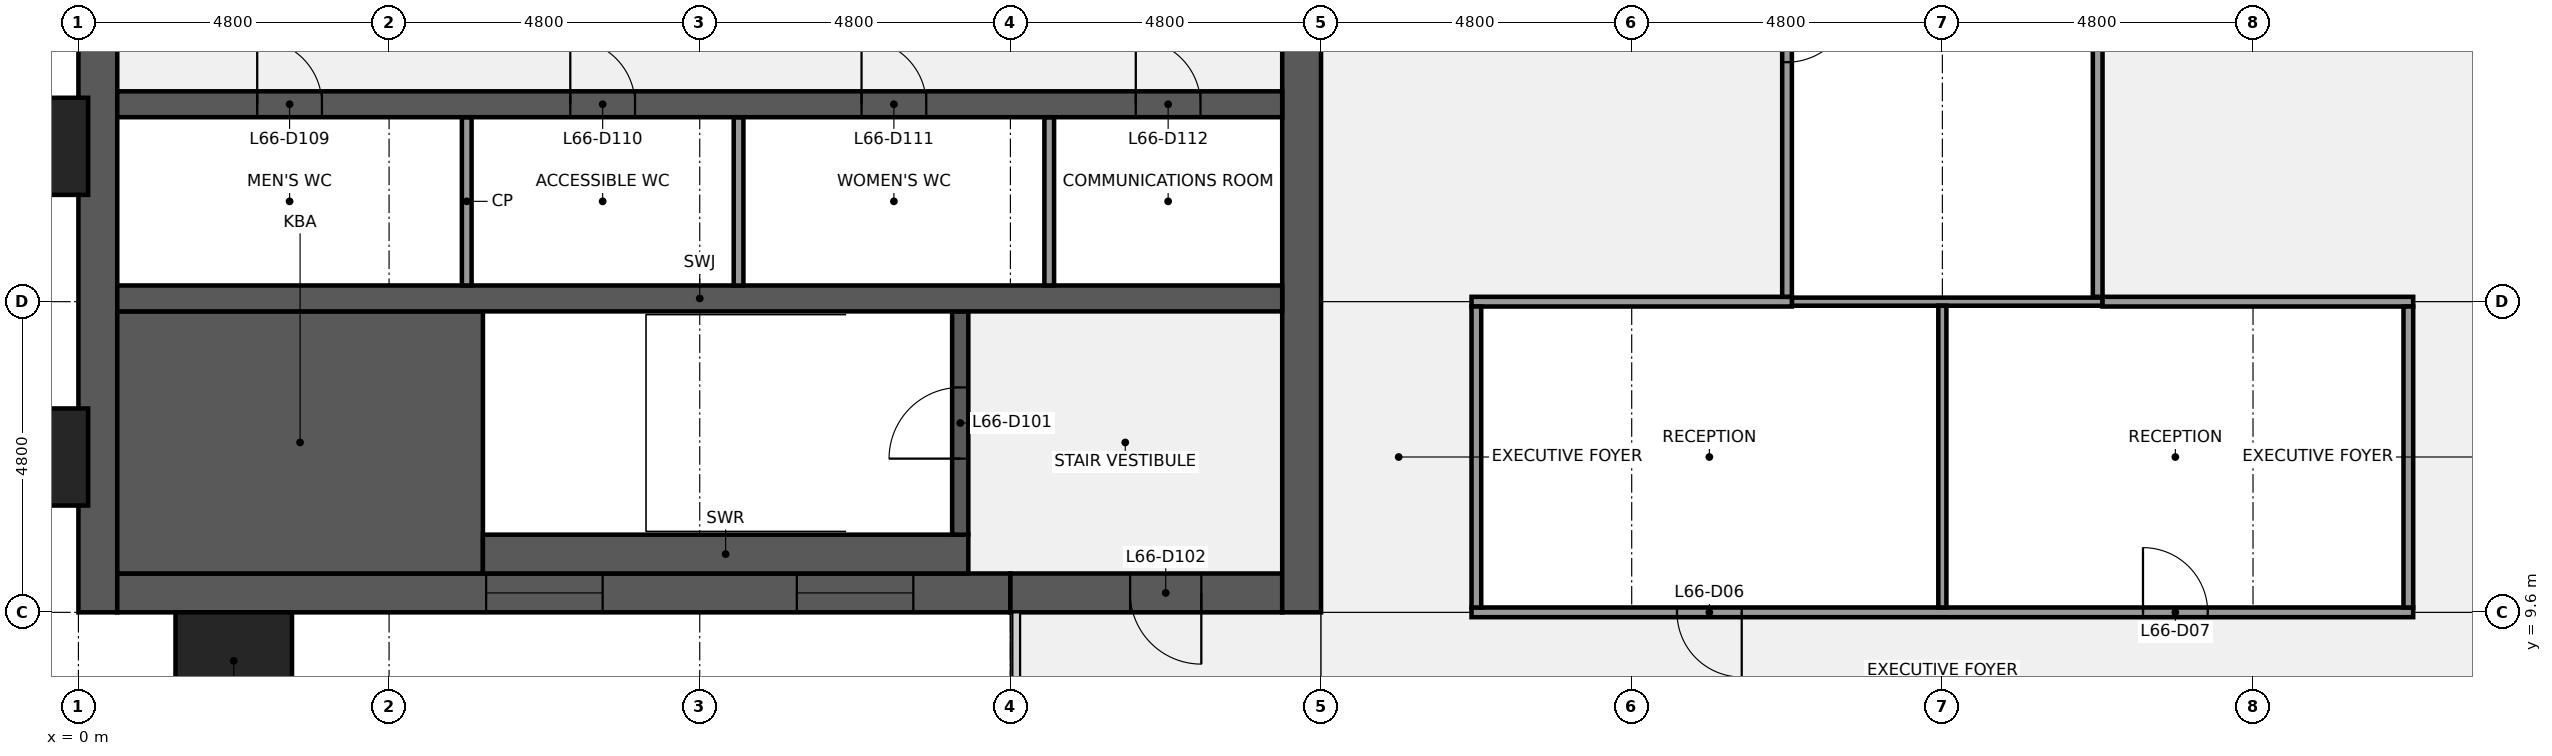
"""IFC4 building model, lengths in metres.
Left out: names, types, materials, properties, quantities, classifications, styles, units other than length and angle.
Written with IfcOpenShell. Run it as: python <this file> out.ifc"""

import sys

from ifc_helpers import new_model, si_unit, direction, frame, frame_2d, origin, origin_2d, place, context, subcontext, project, spatial, rectangle, extrude, element, fill, save


model = new_model("IFC4")
c1 = context("Model", 3, precision=1e-05, world=origin(), true_north=direction((0.0, 1.0)))
c2 = subcontext(c1, "Body", "Model", "MODEL_VIEW")
j1 = project(units=[si_unit("LENGTHUNIT", "METRE"), si_unit("PLANEANGLEUNIT", "RADIAN")], contexts=[c1])
p1 = place(None, origin())
s1 = spatial("IfcSite", under=j1, at=p1, CompositionType="ELEMENT")
p2 = place(p1, origin())
s2 = spatial("IfcBuilding", under=s1, at=p2, CompositionType="ELEMENT")
p3 = place(p2, frame((0.0, 0.0, 302.3)))
s3 = spatial("IfcBuildingStorey", under=s2, at=p3, CompositionType="ELEMENT", Elevation=302.3)
p4 = place(p3, frame((0.3, 9.6, 0.0), z_axis=(0.0, 0.0, 1.0), x_axis=(0.0, 1.0, 0.0)))
e1 = element("IfcWall", 1, at=p4, inside=s3, PredefinedType="SHEAR", context=c2, shape_type="SweptSolid", body=[
    extrude(rectangle(XDim=28.8, YDim=0.6, at=frame_2d((14.4, 0.0))), origin(), (0.0, 0.0, 1.0), 3.84),
])
p5 = place(p4, frame((8.85, 0.0, 0.9)))
e2 = element("IfcOpeningElement", 2, at=p5, cuts=e1, PredefinedType="OPENING", context=c2, shape_type="SweptSolid", body=[
    extrude(rectangle(XDim=1.5, YDim=1.5, at=frame_2d((0.75, 0.75))), frame((0.0, 0.31, 0.0), z_axis=(0.0, -1.0, 0.0), x_axis=(1.0, 0.0, 0.0)), (0.0, 0.0, 1.0), 0.62),
])
p6 = place(p4, frame((18.45, 0.0, 0.9)))
e3 = element("IfcOpeningElement", 3, at=p6, cuts=e1, PredefinedType="OPENING", context=c2, shape_type="SweptSolid", body=[
    extrude(rectangle(XDim=1.5, YDim=1.5, at=frame_2d((0.75, 0.75))), frame((0.0, 0.31, 0.0), z_axis=(0.0, -1.0, 0.0), x_axis=(1.0, 0.0, 0.0)), (0.0, 0.0, 1.0), 0.62),
])
p7 = place(p3, frame((14.4, 9.9, 0.0), z_axis=(0.0, 0.0, 1.0), x_axis=(-1.0, 0.0, 0.0)))
e4 = element("IfcWall", 4, at=p7, inside=s3, PredefinedType="SHEAR", context=c2, shape_type="SweptSolid", body=[
    extrude(rectangle(XDim=13.8, YDim=0.6, at=frame_2d((6.9, 0.0))), origin(), (0.0, 0.0, 1.0), 3.84),
])
p8 = place(p7, frame((6.3, 0.0, 0.9)))
e5 = element("IfcOpeningElement", 5, at=p8, cuts=e4, PredefinedType="OPENING", context=c2, shape_type="SweptSolid", body=[
    extrude(rectangle(XDim=1.8, YDim=1.5, at=frame_2d((0.9, 0.75))), frame((0.0, 0.31, 0.0), z_axis=(0.0, -1.0, 0.0), x_axis=(1.0, 0.0, 0.0)), (0.0, 0.0, 1.0), 0.62),
])
p9 = place(p7, frame((1.5, 0.0, 0.9)))
e6 = element("IfcOpeningElement", 6, at=p9, cuts=e4, PredefinedType="OPENING", context=c2, shape_type="SweptSolid", body=[
    extrude(rectangle(XDim=1.8, YDim=1.5, at=frame_2d((0.9, 0.75))), frame((0.0, 0.31, 0.0), z_axis=(0.0, -1.0, 0.0), x_axis=(1.0, 0.0, 0.0)), (0.0, 0.0, 1.0), 0.62),
])
p10 = place(p3, frame((18.6, 9.9, 0.0), z_axis=(0.0, 0.0, 1.0), x_axis=(-1.0, 0.0, 0.0)))
e7 = element("IfcWall", 7, at=p10, inside=s3, PredefinedType="SHEAR", context=c2, shape_type="SweptSolid", body=[
    extrude(rectangle(XDim=4.2, YDim=0.6, at=frame_2d((2.1, 0.0))), origin(), (0.0, 0.0, 1.0), 3.84),
])
p11 = place(p10, frame((1.25, 0.0, 0.0)))
e8 = element("IfcOpeningElement", 8, at=p11, cuts=e7, PredefinedType="OPENING", context=c2, shape_type="SweptSolid", body=[
    extrude(rectangle(XDim=1.1, YDim=2.1, at=frame_2d((0.55, 1.05))), frame((0.0, 0.31, 0.0), z_axis=(0.0, -1.0, 0.0), x_axis=(1.0, 0.0, 0.0)), (0.0, 0.0, 1.0), 0.62),
])
p12 = place(p3, frame((18.9, 38.4, 0.0), z_axis=(0.0, 0.0, 1.0), x_axis=(0.0, -1.0, 0.0)))
e9 = element("IfcWall", 9, at=p12, inside=s3, PredefinedType="SHEAR", context=c2, shape_type="SweptSolid", body=[
    extrude(rectangle(XDim=28.8, YDim=0.6, at=frame_2d((14.4, 0.0))), origin(), (0.0, 0.0, 1.0), 3.84),
])
p13 = place(p12, frame((18.3, 0.0, 0.0)))
e10 = element("IfcOpeningElement", 10, at=p13, cuts=e9, PredefinedType="OPENING", context=c2, shape_type="SweptSolid", body=[
    extrude(rectangle(XDim=1.8, YDim=2.1, at=frame_2d((0.9, 1.05))), frame((0.0, 0.31, 0.0), z_axis=(0.0, -1.0, 0.0), x_axis=(1.0, 0.0, 0.0)), (0.0, 0.0, 1.0), 0.62),
])
p14 = place(p12, frame((8.7, 0.0, 0.0)))
e11 = element("IfcOpeningElement", 11, at=p14, cuts=e9, PredefinedType="OPENING", context=c2, shape_type="SweptSolid", body=[
    extrude(rectangle(XDim=1.8, YDim=2.1, at=frame_2d((0.9, 1.05))), frame((0.0, 0.31, 0.0), z_axis=(0.0, -1.0, 0.0), x_axis=(1.0, 0.0, 0.0)), (0.0, 0.0, 1.0), 0.62),
])
p15 = place(p3, frame((0.6, 12.225, 0.0), z_axis=(0.0, 0.0, 1.0), x_axis=(1.0, 0.0, 0.0)))
e12 = element("IfcWall", 12, at=p15, inside=s3, PredefinedType="SHEAR", context=c2, shape_type="SweptSolid", body=[
    extrude(rectangle(XDim=5.65, YDim=4.05, at=frame_2d((2.825, 0.0))), origin(), (0.0, 0.0, 1.0), 3.84),
])
p16 = place(p3, frame((6.25, 10.5, 0.0), z_axis=(0.0, 0.0, 1.0), x_axis=(1.0, 0.0, 0.0)))
e13 = element("IfcWall", 13, at=p16, inside=s3, PredefinedType="SHEAR", context=c2, shape_type="SweptSolid", body=[
    extrude(rectangle(XDim=7.5, YDim=0.6, at=frame_2d((3.75, 0.0))), origin(), (0.0, 0.0, 1.0), 3.84),
])
p17 = place(p3, frame((13.625, 10.8, 0.0), z_axis=(0.0, 0.0, 1.0), x_axis=(0.0, 1.0, 0.0)))
e14 = element("IfcWall", 14, at=p17, inside=s3, PredefinedType="SHEAR", context=c2, shape_type="SweptSolid", body=[
    extrude(rectangle(XDim=3.45, YDim=0.25, at=frame_2d((1.725, 0.0))), origin(), (0.0, 0.0, 1.0), 3.84),
])
p18 = place(p17, frame((1.175, 0.0, 0.0)))
e15 = element("IfcOpeningElement", 15, at=p18, cuts=e14, PredefinedType="OPENING", context=c2, shape_type="SweptSolid", body=[
    extrude(rectangle(XDim=1.1, YDim=2.1, at=frame_2d((0.55, 1.05))), frame((0.0, 0.135, 0.0), z_axis=(0.0, -1.0, 0.0), x_axis=(1.0, 0.0, 0.0)), (0.0, 0.0, 1.0), 0.27),
])
p19 = place(p3, frame((0.6, 14.45, 0.0), z_axis=(0.0, 0.0, 1.0), x_axis=(1.0, 0.0, 0.0)))
e16 = element("IfcWall", 16, at=p19, inside=s3, PredefinedType="SHEAR", context=c2, shape_type="SweptSolid", body=[
    extrude(rectangle(XDim=18.0, YDim=0.4, at=frame_2d((9.0, 0.0))), origin(), (0.0, 0.0, 1.0), 3.84),
])
for number, where, z_axis, x_axis in (
    (17, (6.0, 14.65, 0.0), (0.0, 0.0, 1.0), (0.0, 1.0, 0.0)),
    (18, (10.2, 14.65, 0.0), (0.0, 0.0, 1.0), (0.0, 1.0, 0.0)),
    (19, (15.0, 14.65, 0.0), (0.0, 0.0, 1.0), (0.0, 1.0, 0.0)),
):
    element("IfcWall", number, at=place(p3, frame(where, z_axis=z_axis, x_axis=x_axis)), inside=s3, PredefinedType="PARTITIONING", context=c2, shape_type="SweptSolid", body=[
        extrude(rectangle(XDim=2.6, YDim=0.15, at=frame_2d((1.3, 0.0))), origin(), (0.0, 0.0, 1.0), 3.84),
    ])
p20 = place(p3, frame((0.6, 17.45, 0.0), z_axis=(0.0, 0.0, 1.0), x_axis=(1.0, 0.0, 0.0)))
e20 = element("IfcWall", 20, at=p20, inside=s3, PredefinedType="SHEAR", context=c2, shape_type="SweptSolid", body=[
    extrude(rectangle(XDim=18.0, YDim=0.4, at=frame_2d((9.0, 0.0))), origin(), (0.0, 0.0, 1.0), 3.84),
])
p21 = place(p20, frame((2.163, 0.0, 0.0)))
e21 = element("IfcOpeningElement", 21, at=p21, cuts=e20, PredefinedType="OPENING", context=c2, shape_type="SweptSolid", body=[
    extrude(rectangle(XDim=1.0, YDim=2.1, at=frame_2d((0.5, 1.05))), frame((0.0, 0.21, 0.0), z_axis=(0.0, -1.0, 0.0), x_axis=(1.0, 0.0, 0.0)), (0.0, 0.0, 1.0), 0.42),
])
p22 = place(p20, frame((7.0, 0.0, 0.0)))
e22 = element("IfcOpeningElement", 22, at=p22, cuts=e20, PredefinedType="OPENING", context=c2, shape_type="SweptSolid", body=[
    extrude(rectangle(XDim=1.0, YDim=2.1, at=frame_2d((0.5, 1.05))), frame((0.0, 0.21, 0.0), z_axis=(0.0, -1.0, 0.0), x_axis=(1.0, 0.0, 0.0)), (0.0, 0.0, 1.0), 0.42),
])
p23 = place(p20, frame((11.5, 0.0, 0.0)))
e23 = element("IfcOpeningElement", 23, at=p23, cuts=e20, PredefinedType="OPENING", context=c2, shape_type="SweptSolid", body=[
    extrude(rectangle(XDim=1.0, YDim=2.1, at=frame_2d((0.5, 1.05))), frame((0.0, 0.21, 0.0), z_axis=(0.0, -1.0, 0.0), x_axis=(1.0, 0.0, 0.0)), (0.0, 0.0, 1.0), 0.42),
])
p24 = place(p20, frame((15.738, 0.0, 0.0)))
e24 = element("IfcOpeningElement", 24, at=p24, cuts=e20, PredefinedType="OPENING", context=c2, shape_type="SweptSolid", body=[
    extrude(rectangle(XDim=1.0, YDim=2.1, at=frame_2d((0.5, 1.05))), frame((0.0, 0.21, 0.0), z_axis=(0.0, -1.0, 0.0), x_axis=(1.0, 0.0, 0.0)), (0.0, 0.0, 1.0), 0.42),
])
p25 = place(p3, frame((21.525, 9.6, 0.0), z_axis=(0.0, 0.0, 1.0), x_axis=(1.0, 0.0, 0.0)))
e25 = element("IfcWall", 25, at=p25, inside=s3, PredefinedType="PARTITIONING", context=c2, shape_type="SweptSolid", body=[
    extrude(rectangle(XDim=14.55, YDim=0.15, at=frame_2d((7.275, 0.0))), origin(), (0.0, 0.0, 1.0), 2.87),
])
p26 = place(p25, frame((3.175, 0.0, 0.0)))
e26 = element("IfcOpeningElement", 26, at=p26, cuts=e25, PredefinedType="OPENING", context=c2, shape_type="SweptSolid", body=[
    extrude(rectangle(XDim=1.0, YDim=2.1, at=frame_2d((0.5, 1.05))), frame((0.0, 0.085, 0.0), z_axis=(0.0, -1.0, 0.0), x_axis=(1.0, 0.0, 0.0)), (0.0, 0.0, 1.0), 0.17),
])
p27 = place(p25, frame((10.375, 0.0, 0.0)))
e27 = element("IfcOpeningElement", 27, at=p27, cuts=e25, PredefinedType="OPENING", context=c2, shape_type="SweptSolid", body=[
    extrude(rectangle(XDim=1.0, YDim=2.1, at=frame_2d((0.5, 1.05))), frame((0.0, 0.085, 0.0), z_axis=(0.0, -1.0, 0.0), x_axis=(1.0, 0.0, 0.0)), (0.0, 0.0, 1.0), 0.17),
])
p28 = place(p3, frame((26.475, 14.4, 0.0), z_axis=(0.0, 0.0, 1.0), x_axis=(1.0, 0.0, 0.0)))
e28 = element("IfcWall", 28, at=p28, inside=s3, PredefinedType="PARTITIONING", context=c2, shape_type="SweptSolid", body=[
    extrude(rectangle(XDim=4.8, YDim=0.125, at=frame_2d((2.4, 0.0))), origin(), (0.0, 0.0, 1.0), 2.87),
])
p29 = place(p3, frame((21.525, 14.4, 0.0), z_axis=(0.0, 0.0, 1.0), x_axis=(1.0, 0.0, 0.0)))
e29 = element("IfcWall", 29, at=p29, inside=s3, PredefinedType="PARTITIONING", context=c2, shape_type="SweptSolid", body=[
    extrude(rectangle(XDim=4.95, YDim=0.15, at=frame_2d((2.475, 0.0))), origin(), (0.0, 0.0, 1.0), 2.87),
])
p30 = place(p3, frame((31.275, 14.4, 0.0), z_axis=(0.0, 0.0, 1.0), x_axis=(1.0, 0.0, 0.0)))
e30 = element("IfcWall", 30, at=p30, inside=s3, PredefinedType="PARTITIONING", context=c2, shape_type="SweptSolid", body=[
    extrude(rectangle(XDim=4.8, YDim=0.15, at=frame_2d((2.4, 0.0))), origin(), (0.0, 0.0, 1.0), 2.87),
])
p31 = place(p3, frame((21.6, 9.675, 0.0), z_axis=(0.0, 0.0, 1.0), x_axis=(0.0, 1.0, 0.0)))
e31 = element("IfcWall", 31, at=p31, inside=s3, PredefinedType="PARTITIONING", context=c2, shape_type="SweptSolid", body=[
    extrude(rectangle(XDim=4.65, YDim=0.15, at=frame_2d((2.325, 0.0))), origin(), (0.0, 0.0, 1.0), 2.87),
])
p32 = place(p3, frame((26.4, 14.475, 0.0), z_axis=(0.0, 0.0, 1.0), x_axis=(0.0, 1.0, 0.0)))
e32 = element("IfcWall", 32, at=p32, inside=s3, PredefinedType="PARTITIONING", context=c2, shape_type="SweptSolid", body=[
    extrude(rectangle(XDim=8.25, YDim=0.15, at=frame_2d((4.125, 0.0))), origin(), (0.0, 0.0, 1.0), 2.87),
])
p33 = place(p32, frame((3.625, 0.0, 0.0)))
e33 = element("IfcOpeningElement", 33, at=p33, cuts=e32, PredefinedType="OPENING", context=c2, shape_type="SweptSolid", body=[
    extrude(rectangle(XDim=1.0, YDim=2.1, at=frame_2d((0.5, 1.05))), frame((0.0, 0.085, 0.0), z_axis=(0.0, -1.0, 0.0), x_axis=(1.0, 0.0, 0.0)), (0.0, 0.0, 1.0), 0.17),
])
p34 = place(p3, frame((28.8, 9.675, 0.0), z_axis=(0.0, 0.0, 1.0), x_axis=(0.0, 1.0, 0.0)))
e34 = element("IfcWall", 34, at=p34, inside=s3, PredefinedType="PARTITIONING", context=c2, shape_type="SweptSolid", body=[
    extrude(rectangle(XDim=4.662, YDim=0.125, at=frame_2d((2.331, 0.0))), origin(), (0.0, 0.0, 1.0), 2.87),
])
p35 = place(p3, frame((31.2, 14.475, 0.0), z_axis=(0.0, 0.0, 1.0), x_axis=(0.0, 1.0, 0.0)))
e35 = element("IfcWall", 35, at=p35, inside=s3, PredefinedType="PARTITIONING", context=c2, shape_type="SweptSolid", body=[
    extrude(rectangle(XDim=8.25, YDim=0.15, at=frame_2d((4.125, 0.0))), origin(), (0.0, 0.0, 1.0), 2.87),
])
p36 = place(p3, frame((36.0, 9.675, 0.0), z_axis=(0.0, 0.0, 1.0), x_axis=(0.0, 1.0, 0.0)))
e36 = element("IfcWall", 36, at=p36, inside=s3, PredefinedType="PARTITIONING", context=c2, shape_type="SweptSolid", body=[
    extrude(rectangle(XDim=4.65, YDim=0.15, at=frame_2d((2.325, 0.0))), origin(), (0.0, 0.0, 1.0), 2.87),
])
for number, where, z_axis, x_axis in (
    (37, (-0.75, 12.0, 0.0), (0.0, 0.0, 1.0), (0.0, 1.0, 0.0)),
    (38, (-0.75, 16.8, 0.0), (0.0, 0.0, 1.0), (0.0, 1.0, 0.0)),
    (39, (2.4, 8.85, 0.0), (0.0, 0.0, 1.0), (1.0, 0.0, 0.0)),
):
    element("IfcColumn", number, at=place(p3, frame(where, z_axis=z_axis, x_axis=x_axis)), inside=s3, PredefinedType="PILASTER", context=c2, shape_type="SweptSolid", body=[
        extrude(rectangle(XDim=1.8, YDim=1.5, at=origin_2d()), origin(), (0.0, 0.0, 1.0), 4.0),
    ])
p37 = place(p18, origin())
e40 = element("IfcDoor", 40, at=p37, inside=s3, OperationType="SINGLE_SWING_LEFT", PredefinedType="DOOR", context=c2, shape_type="SweptSolid", body=[
    extrude(rectangle(XDim=1.1, YDim=2.1, at=frame_2d((0.55, 1.05))), frame((0.0, 0.025, 0.0), z_axis=(0.0, -1.0, 0.0), x_axis=(1.0, 0.0, 0.0)), (0.0, 0.0, 1.0), 0.05),
])
fill(e15, e40)
p38 = place(p11, origin())
e41 = element("IfcDoor", 41, at=p38, inside=s3, OperationType="SINGLE_SWING_LEFT", PredefinedType="DOOR", context=c2, shape_type="SweptSolid", body=[
    extrude(rectangle(XDim=1.1, YDim=2.1, at=frame_2d((0.55, 1.05))), frame((0.0, 0.025, 0.0), z_axis=(0.0, -1.0, 0.0), x_axis=(1.0, 0.0, 0.0)), (0.0, 0.0, 1.0), 0.05),
])
fill(e8, e41)
p39 = place(p21, origin())
e42 = element("IfcDoor", 42, at=p39, inside=s3, OperationType="SINGLE_SWING_LEFT", PredefinedType="DOOR", context=c2, shape_type="SweptSolid", body=[
    extrude(rectangle(XDim=1.0, YDim=2.1, at=frame_2d((0.5, 1.05))), frame((0.0, 0.025, 0.0), z_axis=(0.0, -1.0, 0.0), x_axis=(1.0, 0.0, 0.0)), (0.0, 0.0, 1.0), 0.05),
])
fill(e21, e42)
p40 = place(p22, origin())
e43 = element("IfcDoor", 43, at=p40, inside=s3, OperationType="SINGLE_SWING_LEFT", PredefinedType="DOOR", context=c2, shape_type="SweptSolid", body=[
    extrude(rectangle(XDim=1.0, YDim=2.1, at=frame_2d((0.5, 1.05))), frame((0.0, 0.025, 0.0), z_axis=(0.0, -1.0, 0.0), x_axis=(1.0, 0.0, 0.0)), (0.0, 0.0, 1.0), 0.05),
])
fill(e22, e43)
p41 = place(p23, origin())
e44 = element("IfcDoor", 44, at=p41, inside=s3, OperationType="SINGLE_SWING_LEFT", PredefinedType="DOOR", context=c2, shape_type="SweptSolid", body=[
    extrude(rectangle(XDim=1.0, YDim=2.1, at=frame_2d((0.5, 1.05))), frame((0.0, 0.025, 0.0), z_axis=(0.0, -1.0, 0.0), x_axis=(1.0, 0.0, 0.0)), (0.0, 0.0, 1.0), 0.05),
])
fill(e23, e44)
p42 = place(p24, origin())
e45 = element("IfcDoor", 45, at=p42, inside=s3, OperationType="SINGLE_SWING_LEFT", PredefinedType="DOOR", context=c2, shape_type="SweptSolid", body=[
    extrude(rectangle(XDim=1.0, YDim=2.1, at=frame_2d((0.5, 1.05))), frame((0.0, 0.025, 0.0), z_axis=(0.0, -1.0, 0.0), x_axis=(1.0, 0.0, 0.0)), (0.0, 0.0, 1.0), 0.05),
])
fill(e24, e45)
p43 = place(p8, origin())
e46 = element("IfcWindow", 46, at=p43, inside=s3, PartitioningType="SINGLE_PANEL", PredefinedType="WINDOW", context=c2, shape_type="SweptSolid", body=[
    extrude(rectangle(XDim=1.8, YDim=1.5, at=frame_2d((0.9, 0.75))), frame((0.0, 0.03, 0.0), z_axis=(0.0, -1.0, 0.0), x_axis=(1.0, 0.0, 0.0)), (0.0, 0.0, 1.0), 0.06),
])
fill(e5, e46)
p44 = place(p9, origin())
e47 = element("IfcWindow", 47, at=p44, inside=s3, PartitioningType="SINGLE_PANEL", PredefinedType="WINDOW", context=c2, shape_type="SweptSolid", body=[
    extrude(rectangle(XDim=1.8, YDim=1.5, at=frame_2d((0.9, 0.75))), frame((0.0, 0.03, 0.0), z_axis=(0.0, -1.0, 0.0), x_axis=(1.0, 0.0, 0.0)), (0.0, 0.0, 1.0), 0.06),
])
fill(e6, e47)
p45 = place(p26, origin())
e48 = element("IfcDoor", 48, at=p45, inside=s3, OperationType="SINGLE_SWING_RIGHT", PredefinedType="DOOR", context=c2, shape_type="SweptSolid", body=[
    extrude(rectangle(XDim=1.0, YDim=2.1, at=frame_2d((0.5, 1.05))), frame((0.0, 0.025, 0.0), z_axis=(0.0, -1.0, 0.0), x_axis=(1.0, 0.0, 0.0)), (0.0, 0.0, 1.0), 0.05),
])
fill(e26, e48)
p46 = place(p27, origin())
e49 = element("IfcDoor", 49, at=p46, inside=s3, OperationType="SINGLE_SWING_LEFT", PredefinedType="DOOR", context=c2, shape_type="SweptSolid", body=[
    extrude(rectangle(XDim=1.0, YDim=2.1, at=frame_2d((0.5, 1.05))), frame((0.0, 0.025, 0.0), z_axis=(0.0, -1.0, 0.0), x_axis=(1.0, 0.0, 0.0)), (0.0, 0.0, 1.0), 0.05),
])
fill(e27, e49)
p47 = place(p33, origin())
e50 = element("IfcDoor", 50, at=p47, inside=s3, OperationType="SINGLE_SWING_RIGHT", PredefinedType="DOOR", context=c2, shape_type="SweptSolid", body=[
    extrude(rectangle(XDim=1.0, YDim=2.1, at=frame_2d((0.5, 1.05))), frame((0.0, 0.025, 0.0), z_axis=(0.0, -1.0, 0.0), x_axis=(1.0, 0.0, 0.0)), (0.0, 0.0, 1.0), 0.05),
])
fill(e33, e50)
save(model, sys.argv[1])
